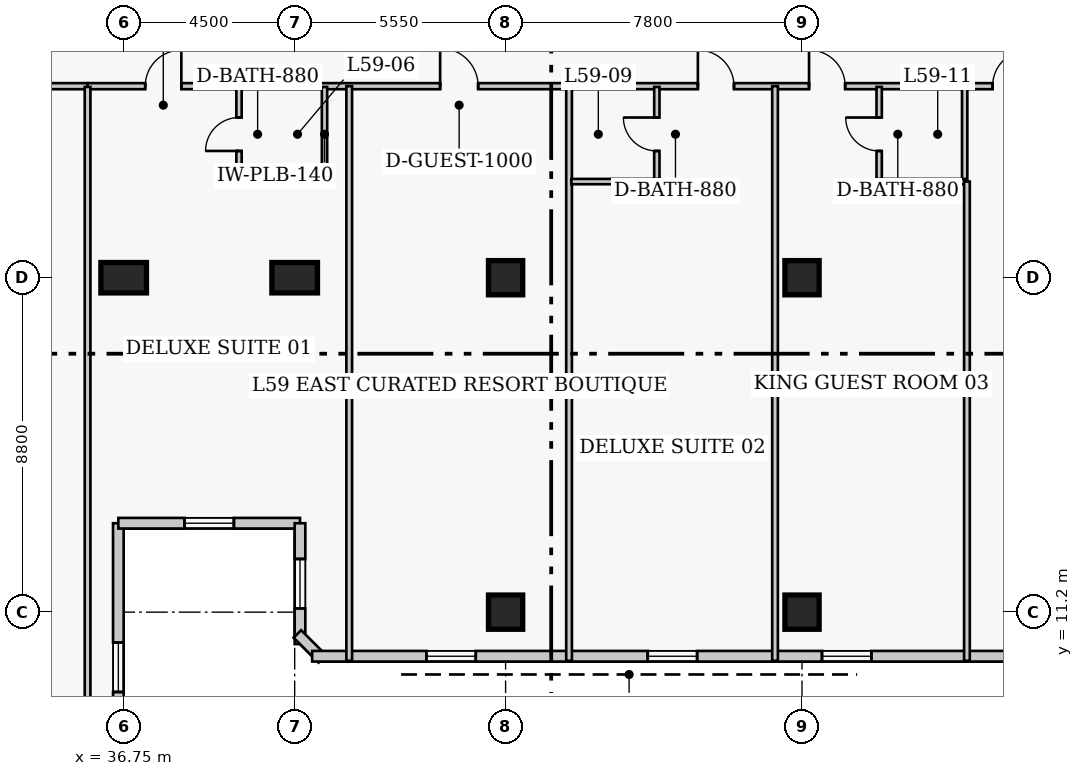
"""IFC4 building model, lengths in metres.
Left out: names, types, materials, properties, quantities, classifications, styles, units other than length and angle.
Written with IfcOpenShell. Run it as: python <this file> out.ifc"""

import sys

from ifc_helpers import new_model, si_unit, direction, frame, frame_2d, origin, origin_2d, place, context, subcontext, project, spatial, rectangle, extrude, element, fill, save


model = new_model("IFC4")
c1 = context("Model", 3, precision=1e-05, world=origin(), true_north=direction((0.0, 1.0)))
c2 = subcontext(c1, "Body", "Model", "MODEL_VIEW")
j1 = project(units=[si_unit("LENGTHUNIT", "METRE"), si_unit("PLANEANGLEUNIT", "RADIAN")], contexts=[c1])
p1 = place(None, origin())
s1 = spatial("IfcSite", under=j1, at=p1, CompositionType="ELEMENT")
p2 = place(p1, origin())
s2 = spatial("IfcBuilding", under=s1, at=p2, CompositionType="ELEMENT")
p3 = place(p2, frame((0.0, 0.0, 236.5)))
s3 = spatial("IfcBuildingStorey", under=s2, at=p3, CompositionType="ELEMENT", Elevation=236.5)
for number, where, z_axis, x_axis in (
    (1, (36.75, 20.0, 0.0), (0.0, 0.0, 1.0), (1.0, 0.0, 0.0)),
    (2, (41.25, 20.0, 0.0), (0.0, 0.0, 1.0), (1.0, 0.0, 0.0)),
):
    element("IfcColumn", number, at=place(p3, frame(where, z_axis=z_axis, x_axis=x_axis)), inside=s3, PredefinedType="COLUMN", context=c2, shape_type="SweptSolid", body=[
        extrude(rectangle(XDim=1.2, YDim=0.8, at=origin_2d()), origin(), (0.0, 0.0, 1.0), 3.9),
    ])
for number, where, z_axis, x_axis in (
    (3, (46.8, 11.2, 0.0), (0.0, 0.0, 1.0), (1.0, 0.0, 0.0)),
    (4, (46.8, 20.0, 0.0), (0.0, 0.0, 1.0), (1.0, 0.0, 0.0)),
    (5, (54.6, 11.2, 0.0), (0.0, 0.0, 1.0), (1.0, 0.0, 0.0)),
    (6, (54.6, 20.0, 0.0), (0.0, 0.0, 1.0), (1.0, 0.0, 0.0)),
):
    element("IfcColumn", number, at=place(p3, frame(where, z_axis=z_axis, x_axis=x_axis)), inside=s3, PredefinedType="COLUMN", context=c2, shape_type="SweptSolid", body=[
        extrude(rectangle(XDim=0.9, YDim=0.9, at=origin_2d()), origin(), (0.0, 0.0, 1.0), 3.9),
    ])
p4 = place(p3, frame((36.61, 5.96, 0.0), z_axis=(0.0, 0.0, 1.0), x_axis=(0.0, 1.0, 0.0)))
e7 = element("IfcWall", 7, at=p4, inside=s3, PredefinedType="SOLIDWALL", context=c2, shape_type="SweptSolid", body=[
    extrude(rectangle(XDim=7.58, YDim=0.28, at=frame_2d((3.79, 0.0))), origin(), (0.0, 0.0, 1.0), 3.52),
])
p5 = place(p4, frame((3.14, 0.0, 0.85)))
e8 = element("IfcOpeningElement", 8, at=p5, cuts=e7, PredefinedType="OPENING", context=c2, shape_type="SweptSolid", body=[
    extrude(rectangle(XDim=1.3, YDim=1.7, at=frame_2d((0.65, 0.85))), frame((0.0, 0.15, 0.0), z_axis=(0.0, -1.0, 0.0), x_axis=(1.0, 0.0, 0.0)), (0.0, 0.0, 1.0), 0.3),
])
p6 = place(p3, frame((36.61, 13.54, 0.0), z_axis=(0.0, 0.0, 1.0), x_axis=(1.0, 0.0, 0.0)))
e9 = element("IfcWall", 9, at=p6, inside=s3, PredefinedType="SOLIDWALL", context=c2, shape_type="SweptSolid", body=[
    extrude(rectangle(XDim=4.78, YDim=0.28, at=frame_2d((2.39, 0.0))), origin(), (0.0, 0.0, 1.0), 3.52),
])
p7 = place(p6, frame((1.74, 0.0, 0.85)))
e10 = element("IfcOpeningElement", 10, at=p7, cuts=e9, PredefinedType="OPENING", context=c2, shape_type="SweptSolid", body=[
    extrude(rectangle(XDim=1.3, YDim=1.7, at=frame_2d((0.65, 0.85))), frame((0.0, 0.15, 0.0), z_axis=(0.0, -1.0, 0.0), x_axis=(1.0, 0.0, 0.0)), (0.0, 0.0, 1.0), 0.3),
])
p8 = place(p3, frame((41.39, 13.54, 0.0), z_axis=(0.0, 0.0, 1.0), x_axis=(0.0, -1.0, 0.0)))
e11 = element("IfcWall", 11, at=p8, inside=s3, PredefinedType="SOLIDWALL", context=c2, shape_type="SweptSolid", body=[
    extrude(rectangle(XDim=3.18, YDim=0.28, at=frame_2d((1.59, 0.0))), origin(), (0.0, 0.0, 1.0), 3.52),
])
p9 = place(p8, frame((0.94, 0.0, 0.85)))
e12 = element("IfcOpeningElement", 12, at=p9, cuts=e11, PredefinedType="OPENING", context=c2, shape_type="SweptSolid", body=[
    extrude(rectangle(XDim=1.3, YDim=1.7, at=frame_2d((0.65, 0.85))), frame((0.0, 0.15, 0.0), z_axis=(0.0, -1.0, 0.0), x_axis=(1.0, 0.0, 0.0)), (0.0, 0.0, 1.0), 0.3),
])
p10 = place(p3, frame((41.321, 10.627, 0.0), z_axis=(0.0, 0.0, 1.0), x_axis=(0.707106781187, -0.707106781187, 0.0)))
e13 = element("IfcWall", 13, at=p10, inside=s3, PredefinedType="SOLIDWALL", context=c2, shape_type="SweptSolid", body=[
    extrude(rectangle(XDim=0.928, YDim=0.28, at=frame_2d((0.464, 0.0))), origin(), (0.0, 0.0, 1.0), 3.52),
])
p11 = place(p3, frame((41.71, 10.04, 0.0), z_axis=(0.0, 0.0, 1.0), x_axis=(1.0, 0.0, 0.0)))
e14 = element("IfcWall", 14, at=p11, inside=s3, PredefinedType="SOLIDWALL", context=c2, shape_type="SweptSolid", body=[
    extrude(rectangle(XDim=25.83, YDim=0.28, at=frame_2d((12.915, 0.0))), origin(), (0.0, 0.0, 1.0), 3.52),
])
p12 = place(p11, frame((3.005, 0.0, 0.85)))
e15 = element("IfcOpeningElement", 15, at=p12, cuts=e14, PredefinedType="OPENING", context=c2, shape_type="SweptSolid", body=[
    extrude(rectangle(XDim=1.3, YDim=1.7, at=frame_2d((0.65, 0.85))), frame((0.0, 0.15, 0.0), z_axis=(0.0, -1.0, 0.0), x_axis=(1.0, 0.0, 0.0)), (0.0, 0.0, 1.0), 0.3),
])
p13 = place(p11, frame((13.415, 0.0, 0.85)))
e16 = element("IfcOpeningElement", 16, at=p13, cuts=e14, PredefinedType="OPENING", context=c2, shape_type="SweptSolid", body=[
    extrude(rectangle(XDim=1.3, YDim=1.7, at=frame_2d((0.65, 0.85))), frame((0.0, 0.15, 0.0), z_axis=(0.0, -1.0, 0.0), x_axis=(1.0, 0.0, 0.0)), (0.0, 0.0, 1.0), 0.3),
])
p14 = place(p11, frame((21.525, 0.0, 0.85)))
e17 = element("IfcOpeningElement", 17, at=p14, cuts=e14, PredefinedType="OPENING", context=c2, shape_type="SweptSolid", body=[
    extrude(rectangle(XDim=1.3, YDim=1.7, at=frame_2d((0.65, 0.85))), frame((0.0, 0.15, 0.0), z_axis=(0.0, -1.0, 0.0), x_axis=(1.0, 0.0, 0.0)), (0.0, 0.0, 1.0), 0.3),
])
p15 = place(p11, frame((8.83, 0.0, 0.85)))
e18 = element("IfcOpeningElement", 18, at=p15, cuts=e14, PredefinedType="OPENING", context=c2, shape_type="SweptSolid", body=[
    extrude(rectangle(XDim=1.3, YDim=1.7, at=frame_2d((0.65, 0.85))), frame((0.0, 0.15, 0.0), z_axis=(0.0, -1.0, 0.0), x_axis=(1.0, 0.0, 0.0)), (0.0, 0.0, 1.0), 0.3),
])
p16 = place(p3, frame((19.35, 25.04, 0.0), z_axis=(0.0, 0.0, 1.0), x_axis=(1.0, 0.0, 0.0)))
e19 = element("IfcWall", 19, at=p16, inside=s3, PredefinedType="PARTITIONING", context=c2, shape_type="SweptSolid", body=[
    extrude(rectangle(XDim=16.45, YDim=0.16, at=frame_2d((8.225, 0.0))), origin(), (0.0, 0.0, 1.0), 3.52),
])
p17 = place(p16, frame((7.755, 0.0, 0.0)))
e20 = element("IfcOpeningElement", 20, at=p17, cuts=e19, PredefinedType="OPENING", context=c2, shape_type="SweptSolid", body=[
    extrude(rectangle(XDim=1.0, YDim=2.15, at=frame_2d((0.5, 1.075))), frame((0.0, 0.09, 0.0), z_axis=(0.0, -1.0, 0.0), x_axis=(1.0, 0.0, 0.0)), (0.0, 0.0, 1.0), 0.18),
])
p18 = place(p3, frame((35.8, 25.04, 0.0), z_axis=(0.0, 0.0, 1.0), x_axis=(1.0, 0.0, 0.0)))
e21 = element("IfcWall", 21, at=p18, inside=s3, PredefinedType="PARTITIONING", context=c2, shape_type="SweptSolid", body=[
    extrude(rectangle(XDim=25.36, YDim=0.16, at=frame_2d((12.68, 0.0))), origin(), (0.0, 0.0, 1.0), 3.52),
])
p19 = place(p18, frame((1.518, 0.0, 0.0)))
e22 = element("IfcOpeningElement", 22, at=p19, cuts=e21, PredefinedType="OPENING", context=c2, shape_type="SweptSolid", body=[
    extrude(rectangle(XDim=0.95, YDim=2.1, at=frame_2d((0.475, 1.05))), frame((0.0, 0.09, 0.0), z_axis=(0.0, -1.0, 0.0), x_axis=(1.0, 0.0, 0.0)), (0.0, 0.0, 1.0), 0.18),
])
p20 = place(p18, frame((9.278, 0.0, 0.0)))
e23 = element("IfcOpeningElement", 23, at=p20, cuts=e21, PredefinedType="OPENING", context=c2, shape_type="SweptSolid", body=[
    extrude(rectangle(XDim=1.0, YDim=2.15, at=frame_2d((0.5, 1.075))), frame((0.0, 0.09, 0.0), z_axis=(0.0, -1.0, 0.0), x_axis=(1.0, 0.0, 0.0)), (0.0, 0.0, 1.0), 0.18),
])
p21 = place(p18, frame((16.06, 0.0, 0.0)))
e24 = element("IfcOpeningElement", 24, at=p21, cuts=e21, PredefinedType="OPENING", context=c2, shape_type="SweptSolid", body=[
    extrude(rectangle(XDim=0.95, YDim=2.1, at=frame_2d((0.475, 1.05))), frame((0.0, 0.09, 0.0), z_axis=(0.0, -1.0, 0.0), x_axis=(1.0, 0.0, 0.0)), (0.0, 0.0, 1.0), 0.18),
])
p22 = place(p18, frame((18.985, 0.0, 0.0)))
e25 = element("IfcOpeningElement", 25, at=p22, cuts=e21, PredefinedType="OPENING", context=c2, shape_type="SweptSolid", body=[
    extrude(rectangle(XDim=0.95, YDim=2.1, at=frame_2d((0.475, 1.05))), frame((0.0, 0.09, 0.0), z_axis=(0.0, -1.0, 0.0), x_axis=(1.0, 0.0, 0.0)), (0.0, 0.0, 1.0), 0.18),
])
p23 = place(p18, frame((23.815, 0.0, 0.0)))
e26 = element("IfcOpeningElement", 26, at=p23, cuts=e21, PredefinedType="OPENING", context=c2, shape_type="SweptSolid", body=[
    extrude(rectangle(XDim=0.95, YDim=2.1, at=frame_2d((0.475, 1.05))), frame((0.0, 0.09, 0.0), z_axis=(0.0, -1.0, 0.0), x_axis=(1.0, 0.0, 0.0)), (0.0, 0.0, 1.0), 0.18),
])
p24 = place(p3, frame((35.8, 5.52, 0.0), z_axis=(0.0, 0.0, 1.0), x_axis=(0.0, 1.0, 0.0)))
e27 = element("IfcWall", 27, at=p24, inside=s3, PredefinedType="PARTITIONING", context=c2, shape_type="SweptSolid", body=[
    extrude(rectangle(XDim=19.5, YDim=0.15, at=frame_2d((9.75, 0.0))), origin(), (0.0, 0.0, 1.0), 3.52),
])
p25 = place(p3, frame((39.785, 22.53, 0.0), z_axis=(0.0, 0.0, 1.0), x_axis=(0.0, 1.0, 0.0)))
e28 = element("IfcWall", 28, at=p25, inside=s3, PredefinedType="PLUMBINGWALL", context=c2, shape_type="SweptSolid", body=[
    extrude(rectangle(XDim=2.49, YDim=0.14, at=frame_2d((1.245, 0.0))), origin(), (0.0, 0.0, 1.0), 3.52),
])
p26 = place(p25, frame((0.805, 0.0, 0.0)))
e29 = element("IfcOpeningElement", 29, at=p26, cuts=e28, PredefinedType="OPENING", context=c2, shape_type="SweptSolid", body=[
    extrude(rectangle(XDim=0.88, YDim=2.05, at=frame_2d((0.44, 1.025))), frame((0.0, 0.08, 0.0), z_axis=(0.0, -1.0, 0.0), x_axis=(1.0, 0.0, 0.0)), (0.0, 0.0, 1.0), 0.16),
])
p27 = place(p3, frame((42.035, 22.53, 0.0), z_axis=(0.0, 0.0, 1.0), x_axis=(0.0, 1.0, 0.0)))
e30 = element("IfcWall", 30, at=p27, inside=s3, PredefinedType="PLUMBINGWALL", context=c2, shape_type="SweptSolid", body=[
    extrude(rectangle(XDim=2.49, YDim=0.14, at=frame_2d((1.245, 0.0))), origin(), (0.0, 0.0, 1.0), 3.52),
])
p28 = place(p3, frame((39.785, 22.53, 0.0), z_axis=(0.0, 0.0, 1.0), x_axis=(1.0, 0.0, 0.0)))
e31 = element("IfcWall", 31, at=p28, inside=s3, PredefinedType="PLUMBINGWALL", context=c2, shape_type="SweptSolid", body=[
    extrude(rectangle(XDim=2.25, YDim=0.14, at=frame_2d((1.125, 0.0))), origin(), (0.0, 0.0, 1.0), 3.52),
])
for number, where, z_axis, x_axis in (
    (32, (42.685, 9.92, 0.0), (0.0, 0.0, 1.0), (0.0, 1.0, 0.0)),
    (33, (48.47, 9.92, 0.0), (0.0, 0.0, 1.0), (0.0, 1.0, 0.0)),
):
    element("IfcWall", number, at=place(p3, frame(where, z_axis=z_axis, x_axis=x_axis)), inside=s3, PredefinedType="PARTITIONING", context=c2, shape_type="SweptSolid", body=[
        extrude(rectangle(XDim=15.12, YDim=0.15, at=frame_2d((7.56, 0.0))), origin(), (0.0, 0.0, 1.0), 3.52),
    ])
p29 = place(p3, frame((50.78, 22.53, 0.0), z_axis=(0.0, 0.0, 1.0), x_axis=(0.0, 1.0, 0.0)))
e34 = element("IfcWall", 34, at=p29, inside=s3, PredefinedType="PLUMBINGWALL", context=c2, shape_type="SweptSolid", body=[
    extrude(rectangle(XDim=2.49, YDim=0.14, at=frame_2d((1.245, 0.0))), origin(), (0.0, 0.0, 1.0), 3.52),
])
p30 = place(p29, frame((0.805, 0.0, 0.0)))
e35 = element("IfcOpeningElement", 35, at=p30, cuts=e34, PredefinedType="OPENING", context=c2, shape_type="SweptSolid", body=[
    extrude(rectangle(XDim=0.88, YDim=2.05, at=frame_2d((0.44, 1.025))), frame((0.0, 0.08, 0.0), z_axis=(0.0, -1.0, 0.0), x_axis=(1.0, 0.0, 0.0)), (0.0, 0.0, 1.0), 0.16),
])
p31 = place(p3, frame((48.53, 22.53, 0.0), z_axis=(0.0, 0.0, 1.0), x_axis=(1.0, 0.0, 0.0)))
e36 = element("IfcWall", 36, at=p31, inside=s3, PredefinedType="PLUMBINGWALL", context=c2, shape_type="SweptSolid", body=[
    extrude(rectangle(XDim=2.25, YDim=0.14, at=frame_2d((1.125, 0.0))), origin(), (0.0, 0.0, 1.0), 3.52),
])
p32 = place(p3, frame((53.89, 9.92, 0.0), z_axis=(0.0, 0.0, 1.0), x_axis=(0.0, 1.0, 0.0)))
e37 = element("IfcWall", 37, at=p32, inside=s3, PredefinedType="PARTITIONING", context=c2, shape_type="SweptSolid", body=[
    extrude(rectangle(XDim=15.12, YDim=0.15, at=frame_2d((7.56, 0.0))), origin(), (0.0, 0.0, 1.0), 3.52),
])
p33 = place(p3, frame((56.63, 22.53, 0.0), z_axis=(0.0, 0.0, 1.0), x_axis=(0.0, 1.0, 0.0)))
e38 = element("IfcWall", 38, at=p33, inside=s3, PredefinedType="PLUMBINGWALL", context=c2, shape_type="SweptSolid", body=[
    extrude(rectangle(XDim=2.49, YDim=0.14, at=frame_2d((1.245, 0.0))), origin(), (0.0, 0.0, 1.0), 3.52),
])
p34 = place(p33, frame((0.805, 0.0, 0.0)))
e39 = element("IfcOpeningElement", 39, at=p34, cuts=e38, PredefinedType="OPENING", context=c2, shape_type="SweptSolid", body=[
    extrude(rectangle(XDim=0.88, YDim=2.05, at=frame_2d((0.44, 1.025))), frame((0.0, 0.08, 0.0), z_axis=(0.0, -1.0, 0.0), x_axis=(1.0, 0.0, 0.0)), (0.0, 0.0, 1.0), 0.16),
])
p35 = place(p3, frame((58.88, 22.53, 0.0), z_axis=(0.0, 0.0, 1.0), x_axis=(0.0, 1.0, 0.0)))
e40 = element("IfcWall", 40, at=p35, inside=s3, PredefinedType="PLUMBINGWALL", context=c2, shape_type="SweptSolid", body=[
    extrude(rectangle(XDim=2.49, YDim=0.14, at=frame_2d((1.245, 0.0))), origin(), (0.0, 0.0, 1.0), 3.52),
])
p36 = place(p3, frame((56.63, 22.53, 0.0), z_axis=(0.0, 0.0, 1.0), x_axis=(1.0, 0.0, 0.0)))
e41 = element("IfcWall", 41, at=p36, inside=s3, PredefinedType="PLUMBINGWALL", context=c2, shape_type="SweptSolid", body=[
    extrude(rectangle(XDim=2.25, YDim=0.14, at=frame_2d((1.125, 0.0))), origin(), (0.0, 0.0, 1.0), 3.52),
])
p37 = place(p3, frame((58.94, 9.92, 0.0), z_axis=(0.0, 0.0, 1.0), x_axis=(0.0, 1.0, 0.0)))
e42 = element("IfcWall", 42, at=p37, inside=s3, PredefinedType="PARTITIONING", context=c2, shape_type="SweptSolid", body=[
    extrude(rectangle(XDim=12.61, YDim=0.15, at=frame_2d((6.305, 0.0))), origin(), (0.0, 0.0, 1.0), 3.52),
])
p38 = place(p5, origin())
e43 = element("IfcWindow", 43, at=p38, inside=s3, PartitioningType="SINGLE_PANEL", PredefinedType="WINDOW", context=c2, shape_type="SweptSolid", body=[
    extrude(rectangle(XDim=1.3, YDim=1.7, at=frame_2d((0.65, 0.85))), frame((0.0, 0.03, 0.0), z_axis=(0.0, -1.0, 0.0), x_axis=(1.0, 0.0, 0.0)), (0.0, 0.0, 1.0), 0.06),
])
fill(e8, e43)
p39 = place(p7, origin())
e44 = element("IfcWindow", 44, at=p39, inside=s3, PartitioningType="SINGLE_PANEL", PredefinedType="WINDOW", context=c2, shape_type="SweptSolid", body=[
    extrude(rectangle(XDim=1.3, YDim=1.7, at=frame_2d((0.65, 0.85))), frame((0.0, 0.03, 0.0), z_axis=(0.0, -1.0, 0.0), x_axis=(1.0, 0.0, 0.0)), (0.0, 0.0, 1.0), 0.06),
])
fill(e10, e44)
p40 = place(p9, origin())
e45 = element("IfcWindow", 45, at=p40, inside=s3, PartitioningType="SINGLE_PANEL", PredefinedType="WINDOW", context=c2, shape_type="SweptSolid", body=[
    extrude(rectangle(XDim=1.3, YDim=1.7, at=frame_2d((0.65, 0.85))), frame((0.0, 0.03, 0.0), z_axis=(0.0, -1.0, 0.0), x_axis=(1.0, 0.0, 0.0)), (0.0, 0.0, 1.0), 0.06),
])
fill(e12, e45)
p41 = place(p12, origin())
e46 = element("IfcWindow", 46, at=p41, inside=s3, PartitioningType="SINGLE_PANEL", PredefinedType="WINDOW", context=c2, shape_type="SweptSolid", body=[
    extrude(rectangle(XDim=1.3, YDim=1.7, at=frame_2d((0.65, 0.85))), frame((0.0, 0.03, 0.0), z_axis=(0.0, -1.0, 0.0), x_axis=(1.0, 0.0, 0.0)), (0.0, 0.0, 1.0), 0.06),
])
fill(e15, e46)
p42 = place(p13, origin())
e47 = element("IfcWindow", 47, at=p42, inside=s3, PartitioningType="SINGLE_PANEL", PredefinedType="WINDOW", context=c2, shape_type="SweptSolid", body=[
    extrude(rectangle(XDim=1.3, YDim=1.7, at=frame_2d((0.65, 0.85))), frame((0.0, 0.03, 0.0), z_axis=(0.0, -1.0, 0.0), x_axis=(1.0, 0.0, 0.0)), (0.0, 0.0, 1.0), 0.06),
])
fill(e16, e47)
p43 = place(p15, origin())
e48 = element("IfcWindow", 48, at=p43, inside=s3, PartitioningType="SINGLE_PANEL", PredefinedType="WINDOW", context=c2, shape_type="SweptSolid", body=[
    extrude(rectangle(XDim=1.3, YDim=1.7, at=frame_2d((0.65, 0.85))), frame((0.0, 0.03, 0.0), z_axis=(0.0, -1.0, 0.0), x_axis=(1.0, 0.0, 0.0)), (0.0, 0.0, 1.0), 0.06),
])
fill(e18, e48)
p44 = place(p26, origin())
e49 = element("IfcDoor", 49, at=p44, inside=s3, OperationType="SINGLE_SWING_LEFT", PredefinedType="DOOR", context=c2, shape_type="SweptSolid", body=[
    extrude(rectangle(XDim=0.88, YDim=2.05, at=frame_2d((0.44, 1.025))), frame((0.0, 0.025, 0.0), z_axis=(0.0, -1.0, 0.0), x_axis=(1.0, 0.0, 0.0)), (0.0, 0.0, 1.0), 0.05),
])
fill(e29, e49)
p45 = place(p19, origin())
e50 = element("IfcDoor", 50, at=p45, inside=s3, OperationType="SINGLE_SWING_RIGHT", PredefinedType="DOOR", context=c2, shape_type="SweptSolid", body=[
    extrude(rectangle(XDim=0.95, YDim=2.1, at=frame_2d((0.475, 1.05))), frame((0.0, 0.025, 0.0), z_axis=(0.0, -1.0, 0.0), x_axis=(1.0, 0.0, 0.0)), (0.0, 0.0, 1.0), 0.05),
])
fill(e22, e50)
p46 = place(p20, origin())
e51 = element("IfcDoor", 51, at=p46, inside=s3, OperationType="SINGLE_SWING_LEFT", PredefinedType="DOOR", context=c2, shape_type="SweptSolid", body=[
    extrude(rectangle(XDim=1.0, YDim=2.15, at=frame_2d((0.5, 1.075))), frame((0.0, 0.025, 0.0), z_axis=(0.0, -1.0, 0.0), x_axis=(1.0, 0.0, 0.0)), (0.0, 0.0, 1.0), 0.05),
])
fill(e23, e51)
p47 = place(p30, origin())
e52 = element("IfcDoor", 52, at=p47, inside=s3, OperationType="SINGLE_SWING_RIGHT", PredefinedType="DOOR", context=c2, shape_type="SweptSolid", body=[
    extrude(rectangle(XDim=0.88, YDim=2.05, at=frame_2d((0.44, 1.025))), frame((0.0, 0.025, 0.0), z_axis=(0.0, -1.0, 0.0), x_axis=(1.0, 0.0, 0.0)), (0.0, 0.0, 1.0), 0.05),
])
fill(e35, e52)
p48 = place(p21, origin())
e53 = element("IfcDoor", 53, at=p48, inside=s3, OperationType="SINGLE_SWING_LEFT", PredefinedType="DOOR", context=c2, shape_type="SweptSolid", body=[
    extrude(rectangle(XDim=0.95, YDim=2.1, at=frame_2d((0.475, 1.05))), frame((0.0, 0.025, 0.0), z_axis=(0.0, -1.0, 0.0), x_axis=(1.0, 0.0, 0.0)), (0.0, 0.0, 1.0), 0.05),
])
fill(e24, e53)
p49 = place(p34, origin())
e54 = element("IfcDoor", 54, at=p49, inside=s3, OperationType="SINGLE_SWING_RIGHT", PredefinedType="DOOR", context=c2, shape_type="SweptSolid", body=[
    extrude(rectangle(XDim=0.88, YDim=2.05, at=frame_2d((0.44, 1.025))), frame((0.0, 0.025, 0.0), z_axis=(0.0, -1.0, 0.0), x_axis=(1.0, 0.0, 0.0)), (0.0, 0.0, 1.0), 0.05),
])
fill(e39, e54)
p50 = place(p22, origin())
e55 = element("IfcDoor", 55, at=p50, inside=s3, OperationType="SINGLE_SWING_LEFT", PredefinedType="DOOR", context=c2, shape_type="SweptSolid", body=[
    extrude(rectangle(XDim=0.95, YDim=2.1, at=frame_2d((0.475, 1.05))), frame((0.0, 0.025, 0.0), z_axis=(0.0, -1.0, 0.0), x_axis=(1.0, 0.0, 0.0)), (0.0, 0.0, 1.0), 0.05),
])
fill(e25, e55)
p51 = place(p23, origin())
e56 = element("IfcDoor", 56, at=p51, inside=s3, OperationType="SINGLE_SWING_RIGHT", PredefinedType="DOOR", context=c2, shape_type="SweptSolid", body=[
    extrude(rectangle(XDim=0.95, YDim=2.1, at=frame_2d((0.475, 1.05))), frame((0.0, 0.025, 0.0), z_axis=(0.0, -1.0, 0.0), x_axis=(1.0, 0.0, 0.0)), (0.0, 0.0, 1.0), 0.05),
])
fill(e26, e56)
save(model, sys.argv[1])
